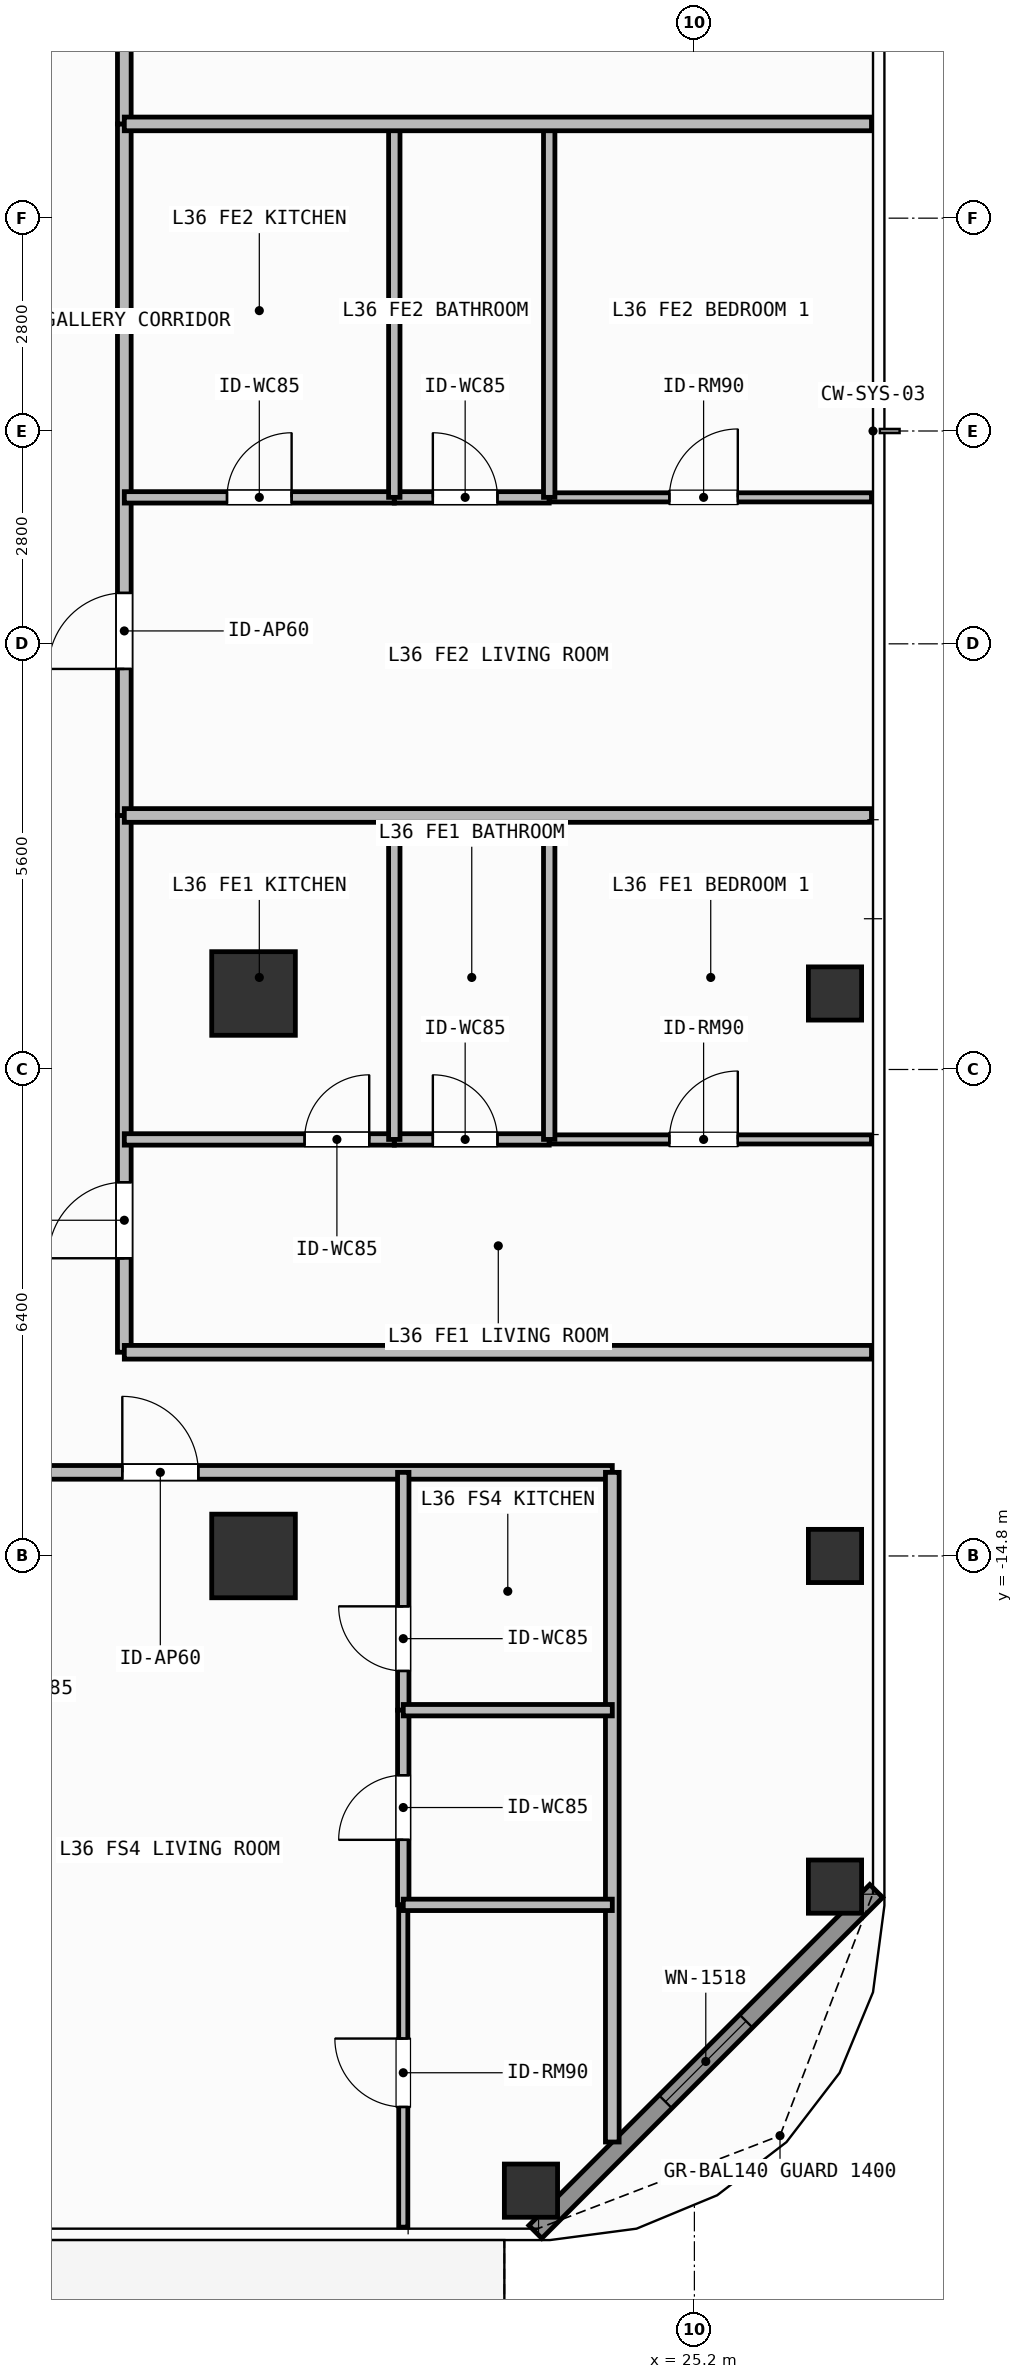
"""IFC4 building model, lengths in metres.
Left out: names, types, materials, properties, quantities, classifications, styles, units other than length and angle.
Written with IfcOpenShell. Run it as: python <this file> out.ifc"""

import sys

from ifc_helpers import new_model, si_unit, direction, frame, frame_2d, origin, origin_2d, place, context, subcontext, project, spatial, rectangle, hollow_rectangle, extrude, element, fill, save


model = new_model("IFC4")
c1 = context("Model", 3, precision=1e-05, world=origin(), true_north=direction((0.0, 1.0)))
c2 = subcontext(c1, "Body", "Model", "MODEL_VIEW")
j1 = project(units=[si_unit("LENGTHUNIT", "METRE"), si_unit("PLANEANGLEUNIT", "RADIAN")], contexts=[c1])
p1 = place(None, origin())
s1 = spatial("IfcSite", under=j1, at=p1, CompositionType="ELEMENT")
p2 = place(p1, origin())
s2 = spatial("IfcBuilding", under=s1, at=p2, CompositionType="ELEMENT")
p3 = place(p2, frame((0.0, 0.0, 144.6)))
s3 = spatial("IfcBuildingStorey", under=s2, at=p3, CompositionType="ELEMENT", Elevation=144.6)
for number, where, z_axis, x_axis in (
    (1, (19.4, -14.8, 0.0), (0.0, 0.0, 1.0), (1.0, 0.0, 0.0)),
    (2, (19.4, -7.4, 0.0), (0.0, 0.0, 1.0), (1.0, 0.0, 0.0)),
):
    element("IfcColumn", number, at=place(p3, frame(where, z_axis=z_axis, x_axis=x_axis)), inside=s3, PredefinedType="COLUMN", context=c2, shape_type="SweptSolid", body=[
        extrude(rectangle(XDim=1.1, YDim=1.1, at=origin_2d()), origin(), (0.0, 0.0, 1.0), 3.9),
    ])
for number, where, z_axis, x_axis in (
    (3, (23.05, -23.15, 0.0), (0.0, 0.0, 1.0), (1.0, 0.0, 0.0)),
    (4, (27.05, -19.15, 0.0), (0.0, 0.0, 1.0), (1.0, 0.0, 0.0)),
    (5, (27.05, -14.8, 0.0), (0.0, 0.0, 1.0), (1.0, 0.0, 0.0)),
    (6, (27.05, -7.4, 0.0), (0.0, 0.0, 1.0), (1.0, 0.0, 0.0)),
):
    element("IfcColumn", number, at=place(p3, frame(where, z_axis=z_axis, x_axis=x_axis)), inside=s3, PredefinedType="COLUMN", context=c2, shape_type="SweptSolid", body=[
        extrude(hollow_rectangle(XDim=0.7, YDim=0.7, WallThickness=0.032, at=origin_2d()), origin(), (0.0, 0.0, 1.0), 3.9),
    ])
p4 = place(p3, frame((27.592, -19.208, 0.0), z_axis=(0.0, 0.0, 1.0), x_axis=(-0.707087534163, -0.707126027686, 0.0)))
e7 = element("IfcWall", 7, at=p4, inside=s3, PredefinedType="SOLIDWALL", context=c2, shape_type="SweptSolid", body=[
    extrude(rectangle(XDim=6.342, YDim=0.24, at=frame_2d((3.171, 0.0))), origin(), (0.0, 0.0, 1.0), 3.68),
])
p5 = place(p4, frame((2.421, 0.0, 0.8)))
e8 = element("IfcOpeningElement", 8, at=p5, cuts=e7, PredefinedType="OPENING", context=c2, shape_type="SweptSolid", body=[
    extrude(rectangle(XDim=1.5, YDim=1.85, at=frame_2d((0.75, 0.925))), frame((0.0, 0.13, 0.0), z_axis=(0.0, -1.0, 0.0), x_axis=(1.0, 0.0, 0.0)), (0.0, 0.0, 1.0), 0.26),
])
p6 = place(p3, frame((15.223, -13.7, 0.0), z_axis=(0.0, 0.0, 1.0), x_axis=(1.0, 0.0, 0.0)))
e9 = element("IfcWall", 9, at=p6, inside=s3, PredefinedType="PARTITIONING", context=c2, shape_type="SweptSolid", body=[
    extrude(rectangle(XDim=8.897, YDim=0.18, at=frame_2d((4.449, 0.0))), origin(), (0.0, 0.0, 1.0), 3.68),
])
p7 = place(p6, frame((2.451, 0.0, 0.0)))
e10 = element("IfcOpeningElement", 10, at=p7, cuts=e9, PredefinedType="OPENING", context=c2, shape_type="SweptSolid", body=[
    extrude(rectangle(XDim=1.0, YDim=2.2, at=frame_2d((0.5, 1.1))), frame((0.0, 0.1, 0.0), z_axis=(0.0, -1.0, 0.0), x_axis=(1.0, 0.0, 0.0)), (0.0, 0.0, 1.0), 0.2),
])
p8 = place(p3, frame((21.37, -16.829, 0.0), z_axis=(0.0, 0.0, 1.0), x_axis=(0.0, 1.0, 0.0)))
e11 = element("IfcWall", 11, at=p8, inside=s3, PredefinedType="PARTITIONING", context=c2, shape_type="SweptSolid", body=[
    extrude(rectangle(XDim=3.129, YDim=0.15, at=frame_2d((1.564, 0.0))), origin(), (0.0, 0.0, 1.0), 3.68),
])
p9 = place(p8, frame((0.516, 0.0, 0.0)))
e12 = element("IfcOpeningElement", 12, at=p9, cuts=e11, PredefinedType="OPENING", context=c2, shape_type="SweptSolid", body=[
    extrude(rectangle(XDim=0.85, YDim=2.1, at=frame_2d((0.425, 1.05))), frame((0.0, 0.085, 0.0), z_axis=(0.0, -1.0, 0.0), x_axis=(1.0, 0.0, 0.0)), (0.0, 0.0, 1.0), 0.17),
])
p10 = place(p3, frame((21.37, -19.39, 0.0), z_axis=(0.0, 0.0, 1.0), x_axis=(0.0, 1.0, 0.0)))
e13 = element("IfcWall", 13, at=p10, inside=s3, PredefinedType="PARTITIONING", context=c2, shape_type="SweptSolid", body=[
    extrude(rectangle(XDim=2.561, YDim=0.15, at=frame_2d((1.28, 0.0))), origin(), (0.0, 0.0, 1.0), 3.68),
])
p11 = place(p10, frame((0.855, 0.0, 0.0)))
e14 = element("IfcOpeningElement", 14, at=p11, cuts=e13, PredefinedType="OPENING", context=c2, shape_type="SweptSolid", body=[
    extrude(rectangle(XDim=0.85, YDim=2.1, at=frame_2d((0.425, 1.05))), frame((0.0, 0.085, 0.0), z_axis=(0.0, -1.0, 0.0), x_axis=(1.0, 0.0, 0.0)), (0.0, 0.0, 1.0), 0.17),
])
p12 = place(p3, frame((21.37, -23.63, 0.0), z_axis=(0.0, 0.0, 1.0), x_axis=(0.0, 1.0, 0.0)))
e15 = element("IfcWall", 15, at=p12, inside=s3, PredefinedType="PARTITIONING", context=c2, shape_type="SweptSolid", body=[
    extrude(rectangle(XDim=4.24, YDim=0.12, at=frame_2d((2.12, 0.0))), origin(), (0.0, 0.0, 1.0), 3.68),
])
p13 = place(p12, frame((1.581, 0.0, 0.0)))
e16 = element("IfcOpeningElement", 16, at=p13, cuts=e15, PredefinedType="OPENING", context=c2, shape_type="SweptSolid", body=[
    extrude(rectangle(XDim=0.9, YDim=2.1, at=frame_2d((0.45, 1.05))), frame((0.0, 0.07, 0.0), z_axis=(0.0, -1.0, 0.0), x_axis=(1.0, 0.0, 0.0)), (0.0, 0.0, 1.0), 0.14),
])
p14 = place(p3, frame((17.7, -12.12, 0.0), z_axis=(0.0, 0.0, 1.0), x_axis=(0.0, 1.0, 0.0)))
e17 = element("IfcWall", 17, at=p14, inside=s3, PredefinedType="PARTITIONING", context=c2, shape_type="SweptSolid", body=[
    extrude(rectangle(XDim=7.062, YDim=0.18, at=frame_2d((3.531, 0.0))), origin(), (0.0, 0.0, 1.0), 3.68),
])
p15 = place(p14, frame((1.237, 0.0, 0.0)))
e18 = element("IfcOpeningElement", 18, at=p15, cuts=e17, PredefinedType="OPENING", context=c2, shape_type="SweptSolid", body=[
    extrude(rectangle(XDim=1.0, YDim=2.2, at=frame_2d((0.5, 1.1))), frame((0.0, 0.1, 0.0), z_axis=(0.0, -1.0, 0.0), x_axis=(1.0, 0.0, 0.0)), (0.0, 0.0, 1.0), 0.2),
])
p16 = place(p3, frame((17.7, -9.32, 0.0), z_axis=(0.0, 0.0, 1.0), x_axis=(1.0, 0.0, 0.0)))
e19 = element("IfcWall", 19, at=p16, inside=s3, PredefinedType="PARTITIONING", context=c2, shape_type="SweptSolid", body=[
    extrude(rectangle(XDim=3.552, YDim=0.15, at=frame_2d((1.776, 0.0))), origin(), (0.0, 0.0, 1.0), 3.68),
])
p17 = place(p16, frame((2.372, 0.0, 0.0)))
e20 = element("IfcOpeningElement", 20, at=p17, cuts=e19, PredefinedType="OPENING", context=c2, shape_type="SweptSolid", body=[
    extrude(rectangle(XDim=0.85, YDim=2.1, at=frame_2d((0.425, 1.05))), frame((0.0, 0.085, 0.0), z_axis=(0.0, -1.0, 0.0), x_axis=(1.0, 0.0, 0.0)), (0.0, 0.0, 1.0), 0.17),
])
p18 = place(p3, frame((21.252, -9.32, 0.0), z_axis=(0.0, 0.0, 1.0), x_axis=(1.0, 0.0, 0.0)))
e21 = element("IfcWall", 21, at=p18, inside=s3, PredefinedType="PARTITIONING", context=c2, shape_type="SweptSolid", body=[
    extrude(rectangle(XDim=2.038, YDim=0.15, at=frame_2d((1.019, 0.0))), origin(), (0.0, 0.0, 1.0), 3.68),
])
p19 = place(p18, frame((0.507, 0.0, 0.0)))
e22 = element("IfcOpeningElement", 22, at=p19, cuts=e21, PredefinedType="OPENING", context=c2, shape_type="SweptSolid", body=[
    extrude(rectangle(XDim=0.85, YDim=2.1, at=frame_2d((0.425, 1.05))), frame((0.0, 0.085, 0.0), z_axis=(0.0, -1.0, 0.0), x_axis=(1.0, 0.0, 0.0)), (0.0, 0.0, 1.0), 0.17),
])
p20 = place(p3, frame((23.29, -9.32, 0.0), z_axis=(0.0, 0.0, 1.0), x_axis=(1.0, 0.0, 0.0)))
e23 = element("IfcWall", 23, at=p20, inside=s3, PredefinedType="PARTITIONING", context=c2, shape_type="SweptSolid", body=[
    extrude(rectangle(XDim=4.24, YDim=0.12, at=frame_2d((2.12, 0.0))), origin(), (0.0, 0.0, 1.0), 3.68),
])
p21 = place(p20, frame((1.581, 0.0, 0.0)))
e24 = element("IfcOpeningElement", 24, at=p21, cuts=e23, PredefinedType="OPENING", context=c2, shape_type="SweptSolid", body=[
    extrude(rectangle(XDim=0.9, YDim=2.1, at=frame_2d((0.45, 1.05))), frame((0.0, 0.07, 0.0), z_axis=(0.0, -1.0, 0.0), x_axis=(1.0, 0.0, 0.0)), (0.0, 0.0, 1.0), 0.14),
])
p22 = place(p3, frame((17.7, -5.058, 0.0), z_axis=(0.0, 0.0, 1.0), x_axis=(0.0, 1.0, 0.0)))
e25 = element("IfcWall", 25, at=p22, inside=s3, PredefinedType="PARTITIONING", context=c2, shape_type="SweptSolid", body=[
    extrude(rectangle(XDim=9.098, YDim=0.18, at=frame_2d((4.549, 0.0))), origin(), (0.0, 0.0, 1.0), 3.68),
])
p23 = place(p22, frame((1.928, 0.0, 0.0)))
e26 = element("IfcOpeningElement", 26, at=p23, cuts=e25, PredefinedType="OPENING", context=c2, shape_type="SweptSolid", body=[
    extrude(rectangle(XDim=1.0, YDim=2.2, at=frame_2d((0.5, 1.1))), frame((0.0, 0.1, 0.0), z_axis=(0.0, -1.0, 0.0), x_axis=(1.0, 0.0, 0.0)), (0.0, 0.0, 1.0), 0.2),
])
p24 = place(p3, frame((17.7, -0.873, 0.0), z_axis=(0.0, 0.0, 1.0), x_axis=(1.0, 0.0, 0.0)))
e27 = element("IfcWall", 27, at=p24, inside=s3, PredefinedType="PARTITIONING", context=c2, shape_type="SweptSolid", body=[
    extrude(rectangle(XDim=3.552, YDim=0.15, at=frame_2d((1.776, 0.0))), origin(), (0.0, 0.0, 1.0), 3.68),
])
p25 = place(p24, frame((1.351, 0.0, 0.0)))
e28 = element("IfcOpeningElement", 28, at=p25, cuts=e27, PredefinedType="OPENING", context=c2, shape_type="SweptSolid", body=[
    extrude(rectangle(XDim=0.85, YDim=2.1, at=frame_2d((0.425, 1.05))), frame((0.0, 0.085, 0.0), z_axis=(0.0, -1.0, 0.0), x_axis=(1.0, 0.0, 0.0)), (0.0, 0.0, 1.0), 0.17),
])
p26 = place(p3, frame((21.252, -0.873, 0.0), z_axis=(0.0, 0.0, 1.0), x_axis=(1.0, 0.0, 0.0)))
e29 = element("IfcWall", 29, at=p26, inside=s3, PredefinedType="PARTITIONING", context=c2, shape_type="SweptSolid", body=[
    extrude(rectangle(XDim=2.038, YDim=0.15, at=frame_2d((1.019, 0.0))), origin(), (0.0, 0.0, 1.0), 3.68),
])
p27 = place(p26, frame((0.507, 0.0, 0.0)))
e30 = element("IfcOpeningElement", 30, at=p27, cuts=e29, PredefinedType="OPENING", context=c2, shape_type="SweptSolid", body=[
    extrude(rectangle(XDim=0.85, YDim=2.1, at=frame_2d((0.425, 1.05))), frame((0.0, 0.085, 0.0), z_axis=(0.0, -1.0, 0.0), x_axis=(1.0, 0.0, 0.0)), (0.0, 0.0, 1.0), 0.17),
])
p28 = place(p3, frame((23.29, -0.873, 0.0), z_axis=(0.0, 0.0, 1.0), x_axis=(1.0, 0.0, 0.0)))
e31 = element("IfcWall", 31, at=p28, inside=s3, PredefinedType="PARTITIONING", context=c2, shape_type="SweptSolid", body=[
    extrude(rectangle(XDim=4.24, YDim=0.12, at=frame_2d((2.12, 0.0))), origin(), (0.0, 0.0, 1.0), 3.68),
])
p29 = place(p28, frame((1.581, 0.0, 0.0)))
e32 = element("IfcOpeningElement", 32, at=p29, cuts=e31, PredefinedType="OPENING", context=c2, shape_type="SweptSolid", body=[
    extrude(rectangle(XDim=0.9, YDim=2.1, at=frame_2d((0.45, 1.05))), frame((0.0, 0.07, 0.0), z_axis=(0.0, -1.0, 0.0), x_axis=(1.0, 0.0, 0.0)), (0.0, 0.0, 1.0), 0.14),
])
p30 = place(p3, frame((17.7, 4.04, 0.0), z_axis=(0.0, 0.0, 1.0), x_axis=(0.0, 1.0, 0.0)))
e33 = element("IfcWall", 33, at=p30, inside=s3, PredefinedType="PARTITIONING", context=c2, shape_type="SweptSolid", body=[
    extrude(rectangle(XDim=8.08, YDim=0.18, at=frame_2d((4.04, 0.0))), origin(), (0.0, 0.0, 1.0), 3.68),
])
p31 = place(p30, frame((1.761, 0.0, 0.0)))
e34 = element("IfcOpeningElement", 34, at=p31, cuts=e33, PredefinedType="OPENING", context=c2, shape_type="SweptSolid", body=[
    extrude(rectangle(XDim=1.0, YDim=2.2, at=frame_2d((0.5, 1.1))), frame((0.0, 0.1, 0.0), z_axis=(0.0, -1.0, 0.0), x_axis=(1.0, 0.0, 0.0)), (0.0, 0.0, 1.0), 0.2),
])
p32 = place(p3, frame((24.12, -22.51, 0.0), z_axis=(0.0, 0.0, 1.0), x_axis=(0.0, 1.0, 0.0)))
e35 = element("IfcWall", 35, at=p32, inside=s3, PredefinedType="PARTITIONING", context=c2, shape_type="SweptSolid", body=[
    extrude(rectangle(XDim=8.81, YDim=0.18, at=frame_2d((4.405, 0.0))), origin(), (0.0, 0.0, 1.0), 3.68),
])
for number, where, z_axis, x_axis in (
    (36, (21.37, -16.829, 0.0), (0.0, 0.0, 1.0), (1.0, 0.0, 0.0)),
    (37, (21.37, -19.39, 0.0), (0.0, 0.0, 1.0), (1.0, 0.0, 0.0)),
):
    element("IfcWall", number, at=place(p3, frame(where, z_axis=z_axis, x_axis=x_axis)), inside=s3, PredefinedType="PARTITIONING", context=c2, shape_type="SweptSolid", body=[
        extrude(rectangle(XDim=2.75, YDim=0.15, at=frame_2d((1.375, 0.0))), origin(), (0.0, 0.0, 1.0), 3.68),
    ])
for number, where, z_axis, x_axis in (
    (38, (21.252, -9.32, 0.0), (0.0, 0.0, 1.0), (0.0, 1.0, 0.0)),
    (39, (23.29, -9.32, 0.0), (0.0, 0.0, 1.0), (0.0, 1.0, 0.0)),
):
    element("IfcWall", number, at=place(p3, frame(where, z_axis=z_axis, x_axis=x_axis)), inside=s3, PredefinedType="PARTITIONING", context=c2, shape_type="SweptSolid", body=[
        extrude(rectangle(XDim=4.262, YDim=0.15, at=frame_2d((2.131, 0.0))), origin(), (0.0, 0.0, 1.0), 3.68),
    ])
for number, where, z_axis, x_axis in (
    (40, (21.252, -0.873, 0.0), (0.0, 0.0, 1.0), (0.0, 1.0, 0.0)),
    (41, (23.29, -0.873, 0.0), (0.0, 0.0, 1.0), (0.0, 1.0, 0.0)),
):
    element("IfcWall", number, at=place(p3, frame(where, z_axis=z_axis, x_axis=x_axis)), inside=s3, PredefinedType="PARTITIONING", context=c2, shape_type="SweptSolid", body=[
        extrude(rectangle(XDim=4.913, YDim=0.15, at=frame_2d((2.457, 0.0))), origin(), (0.0, 0.0, 1.0), 3.68),
    ])
for number, where, z_axis, x_axis in (
    (42, (17.7, -5.058, 0.0), (0.0, 0.0, 1.0), (1.0, 0.0, 0.0)),
    (43, (17.7, 4.04, 0.0), (0.0, 0.0, 1.0), (1.0, 0.0, 0.0)),
    (44, (17.7, -12.12, 0.0), (0.0, 0.0, 1.0), (1.0, 0.0, 0.0)),
):
    element("IfcWall", number, at=place(p3, frame(where, z_axis=z_axis, x_axis=x_axis)), inside=s3, PredefinedType="PARTITIONING", context=c2, shape_type="SweptSolid", body=[
        extrude(rectangle(XDim=9.83, YDim=0.18, at=frame_2d((4.915, 0.0))), origin(), (0.0, 0.0, 1.0), 3.68),
    ])
p33 = place(p5, origin())
e45 = element("IfcWindow", 45, at=p33, inside=s3, PartitioningType="SINGLE_PANEL", PredefinedType="WINDOW", context=c2, shape_type="SweptSolid", body=[
    extrude(rectangle(XDim=1.5, YDim=1.85, at=frame_2d((0.75, 0.925))), frame((0.0, 0.03, 0.0), z_axis=(0.0, -1.0, 0.0), x_axis=(1.0, 0.0, 0.0)), (0.0, 0.0, 1.0), 0.06),
])
fill(e8, e45)
p34 = place(p7, origin())
e46 = element("IfcDoor", 46, at=p34, inside=s3, OperationType="SINGLE_SWING_LEFT", PredefinedType="DOOR", context=c2, shape_type="SweptSolid", body=[
    extrude(rectangle(XDim=1.0, YDim=2.2, at=frame_2d((0.5, 1.1))), frame((0.0, 0.025, 0.0), z_axis=(0.0, -1.0, 0.0), x_axis=(1.0, 0.0, 0.0)), (0.0, 0.0, 1.0), 0.05),
])
fill(e10, e46)
p35 = place(p9, origin())
e47 = element("IfcDoor", 47, at=p35, inside=s3, OperationType="SINGLE_SWING_RIGHT", PredefinedType="DOOR", context=c2, shape_type="SweptSolid", body=[
    extrude(rectangle(XDim=0.85, YDim=2.1, at=frame_2d((0.425, 1.05))), frame((0.0, 0.025, 0.0), z_axis=(0.0, -1.0, 0.0), x_axis=(1.0, 0.0, 0.0)), (0.0, 0.0, 1.0), 0.05),
])
fill(e12, e47)
p36 = place(p11, origin())
e48 = element("IfcDoor", 48, at=p36, inside=s3, OperationType="SINGLE_SWING_LEFT", PredefinedType="DOOR", context=c2, shape_type="SweptSolid", body=[
    extrude(rectangle(XDim=0.85, YDim=2.1, at=frame_2d((0.425, 1.05))), frame((0.0, 0.025, 0.0), z_axis=(0.0, -1.0, 0.0), x_axis=(1.0, 0.0, 0.0)), (0.0, 0.0, 1.0), 0.05),
])
fill(e14, e48)
p37 = place(p13, origin())
e49 = element("IfcDoor", 49, at=p37, inside=s3, OperationType="SINGLE_SWING_RIGHT", PredefinedType="DOOR", context=c2, shape_type="SweptSolid", body=[
    extrude(rectangle(XDim=0.9, YDim=2.1, at=frame_2d((0.45, 1.05))), frame((0.0, 0.025, 0.0), z_axis=(0.0, -1.0, 0.0), x_axis=(1.0, 0.0, 0.0)), (0.0, 0.0, 1.0), 0.05),
])
fill(e16, e49)
p38 = place(p15, origin())
e50 = element("IfcDoor", 50, at=p38, inside=s3, OperationType="SINGLE_SWING_LEFT", PredefinedType="DOOR", context=c2, shape_type="SweptSolid", body=[
    extrude(rectangle(XDim=1.0, YDim=2.2, at=frame_2d((0.5, 1.1))), frame((0.0, 0.025, 0.0), z_axis=(0.0, -1.0, 0.0), x_axis=(1.0, 0.0, 0.0)), (0.0, 0.0, 1.0), 0.05),
])
fill(e18, e50)
p39 = place(p17, origin())
e51 = element("IfcDoor", 51, at=p39, inside=s3, OperationType="SINGLE_SWING_RIGHT", PredefinedType="DOOR", context=c2, shape_type="SweptSolid", body=[
    extrude(rectangle(XDim=0.85, YDim=2.1, at=frame_2d((0.425, 1.05))), frame((0.0, 0.025, 0.0), z_axis=(0.0, -1.0, 0.0), x_axis=(1.0, 0.0, 0.0)), (0.0, 0.0, 1.0), 0.05),
])
fill(e20, e51)
p40 = place(p19, origin())
e52 = element("IfcDoor", 52, at=p40, inside=s3, OperationType="SINGLE_SWING_LEFT", PredefinedType="DOOR", context=c2, shape_type="SweptSolid", body=[
    extrude(rectangle(XDim=0.85, YDim=2.1, at=frame_2d((0.425, 1.05))), frame((0.0, 0.025, 0.0), z_axis=(0.0, -1.0, 0.0), x_axis=(1.0, 0.0, 0.0)), (0.0, 0.0, 1.0), 0.05),
])
fill(e22, e52)
p41 = place(p21, origin())
e53 = element("IfcDoor", 53, at=p41, inside=s3, OperationType="SINGLE_SWING_RIGHT", PredefinedType="DOOR", context=c2, shape_type="SweptSolid", body=[
    extrude(rectangle(XDim=0.9, YDim=2.1, at=frame_2d((0.45, 1.05))), frame((0.0, 0.025, 0.0), z_axis=(0.0, -1.0, 0.0), x_axis=(1.0, 0.0, 0.0)), (0.0, 0.0, 1.0), 0.05),
])
fill(e24, e53)
p42 = place(p23, origin())
e54 = element("IfcDoor", 54, at=p42, inside=s3, OperationType="SINGLE_SWING_LEFT", PredefinedType="DOOR", context=c2, shape_type="SweptSolid", body=[
    extrude(rectangle(XDim=1.0, YDim=2.2, at=frame_2d((0.5, 1.1))), frame((0.0, 0.025, 0.0), z_axis=(0.0, -1.0, 0.0), x_axis=(1.0, 0.0, 0.0)), (0.0, 0.0, 1.0), 0.05),
])
fill(e26, e54)
p43 = place(p25, origin())
e55 = element("IfcDoor", 55, at=p43, inside=s3, OperationType="SINGLE_SWING_RIGHT", PredefinedType="DOOR", context=c2, shape_type="SweptSolid", body=[
    extrude(rectangle(XDim=0.85, YDim=2.1, at=frame_2d((0.425, 1.05))), frame((0.0, 0.025, 0.0), z_axis=(0.0, -1.0, 0.0), x_axis=(1.0, 0.0, 0.0)), (0.0, 0.0, 1.0), 0.05),
])
fill(e28, e55)
p44 = place(p27, origin())
e56 = element("IfcDoor", 56, at=p44, inside=s3, OperationType="SINGLE_SWING_LEFT", PredefinedType="DOOR", context=c2, shape_type="SweptSolid", body=[
    extrude(rectangle(XDim=0.85, YDim=2.1, at=frame_2d((0.425, 1.05))), frame((0.0, 0.025, 0.0), z_axis=(0.0, -1.0, 0.0), x_axis=(1.0, 0.0, 0.0)), (0.0, 0.0, 1.0), 0.05),
])
fill(e30, e56)
p45 = place(p29, origin())
e57 = element("IfcDoor", 57, at=p45, inside=s3, OperationType="SINGLE_SWING_RIGHT", PredefinedType="DOOR", context=c2, shape_type="SweptSolid", body=[
    extrude(rectangle(XDim=0.9, YDim=2.1, at=frame_2d((0.45, 1.05))), frame((0.0, 0.025, 0.0), z_axis=(0.0, -1.0, 0.0), x_axis=(1.0, 0.0, 0.0)), (0.0, 0.0, 1.0), 0.05),
])
fill(e32, e57)
save(model, sys.argv[1])
